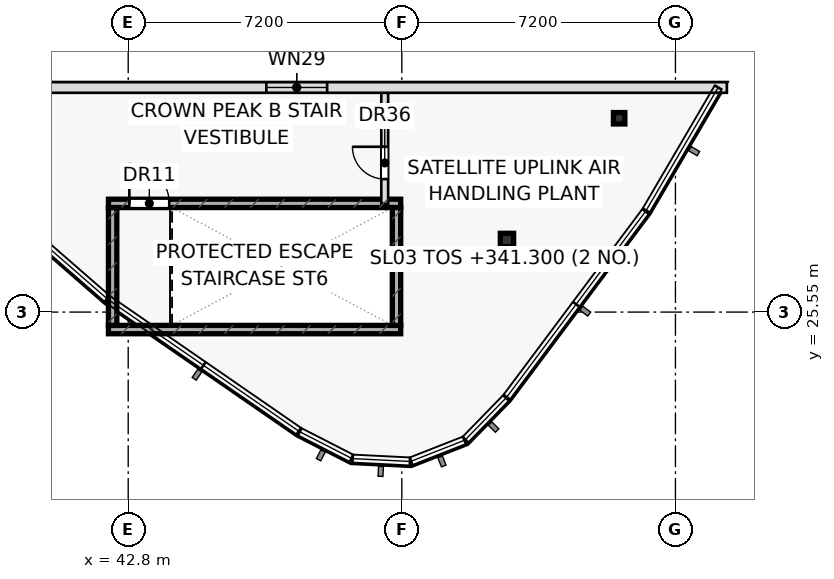
"""IFC4 building model, lengths in metres.
Left out: names, types, materials, properties, quantities, classifications, styles, units other than length and angle.
Written with IfcOpenShell. Run it as: python <this file> out.ifc"""

import sys

from ifc_helpers import new_model, si_unit, direction, frame, frame_2d, origin, origin_2d, place, context, subcontext, project, spatial, rectangle, hollow_rectangle, extrude, element, fill, save


model = new_model("IFC4")
c1 = context("Model", 3, precision=1e-05, world=origin(), true_north=direction((0.0, 1.0)))
c2 = subcontext(c1, "Body", "Model", "MODEL_VIEW")
j1 = project(units=[si_unit("LENGTHUNIT", "METRE"), si_unit("PLANEANGLEUNIT", "RADIAN")], contexts=[c1])
p1 = place(None, origin())
s1 = spatial("IfcSite", under=j1, at=p1, CompositionType="ELEMENT")
p2 = place(p1, origin())
s2 = spatial("IfcBuilding", under=s1, at=p2, CompositionType="ELEMENT")
p3 = place(p2, frame((0.0, 0.0, 341.3)))
s3 = spatial("IfcBuildingStorey", under=s2, at=p3, CompositionType="ELEMENT", Elevation=341.3)
p4 = place(p3, frame((42.28, 25.09, 0.0), z_axis=(0.0, 0.0, 1.0), x_axis=(1.0, 0.0, 0.0)))
e1 = element("IfcWall", 1, at=p4, inside=s3, PredefinedType="SHEAR", context=c2, shape_type="SweptSolid", body=[
    extrude(rectangle(XDim=7.69, YDim=0.22, at=frame_2d((3.845, 0.0))), origin(), (0.0, 0.0, 1.0), 4.25),
])
p5 = place(p3, frame((42.28, 28.41, 0.0), z_axis=(0.0, 0.0, 1.0), x_axis=(1.0, 0.0, 0.0)))
e2 = element("IfcWall", 2, at=p5, inside=s3, PredefinedType="SHEAR", context=c2, shape_type="SweptSolid", body=[
    extrude(rectangle(XDim=7.69, YDim=0.22, at=frame_2d((3.845, 0.0))), origin(), (0.0, 0.0, 1.0), 4.25),
])
p6 = place(p5, frame((0.55, 0.0, 0.0)))
e3 = element("IfcOpeningElement", 3, at=p6, cuts=e2, PredefinedType="OPENING", context=c2, shape_type="SweptSolid", body=[
    extrude(rectangle(XDim=1.05, YDim=2.2, at=frame_2d((0.525, 1.1))), frame((0.0, 0.12, 0.0), z_axis=(0.0, -1.0, 0.0), x_axis=(1.0, 0.0, 0.0)), (0.0, 0.0, 1.0), 0.24),
])
for number, where, z_axis, x_axis in (
    (4, (49.86, 25.2, 0.0), (0.0, 0.0, 1.0), (0.0, 1.0, 0.0)),
    (5, (42.39, 25.2, 0.0), (0.0, 0.0, 1.0), (0.0, 1.0, 0.0)),
):
    element("IfcWall", number, at=place(p3, frame(where, z_axis=z_axis, x_axis=x_axis)), inside=s3, PredefinedType="SHEAR", context=c2, shape_type="SweptSolid", body=[
        extrude(rectangle(XDim=3.1, YDim=0.22, at=frame_2d((1.55, 0.0))), origin(), (0.0, 0.0, 1.0), 4.25),
    ])
p7 = place(p3, frame((52.767, 27.448, 0.0), z_axis=(0.0, 0.0, 1.0), x_axis=(1.0, 0.0, 0.0)))
e6 = element("IfcColumn", 6, at=p7, inside=s3, PredefinedType="COLUMN", context=c2, shape_type="SweptSolid", body=[
    extrude(hollow_rectangle(XDim=0.35, YDim=0.35, WallThickness=0.02, at=origin_2d()), origin(), (0.0, 0.0, 1.0), 4.25),
])
p8 = place(p3, frame((55.719, 30.65, 0.0), z_axis=(0.0, 0.0, 1.0), x_axis=(1.0, 0.0, 0.0)))
e7 = element("IfcColumn", 7, at=p8, inside=s3, PredefinedType="COLUMN", context=c2, shape_type="SweptSolid", body=[
    extrude(hollow_rectangle(XDim=0.3, YDim=0.3, WallThickness=0.016, at=origin_2d()), origin(), (0.0, 0.0, 1.0), 4.25),
])
p9 = place(p3, frame((49.55, 28.4, 0.0), z_axis=(0.0, 0.0, 1.0), x_axis=(0.0, 1.0, 0.0)))
e8 = element("IfcWall", 8, at=p9, inside=s3, PredefinedType="PARTITIONING", context=c2, shape_type="SweptSolid", body=[
    extrude(rectangle(XDim=3.1, YDim=0.18, at=frame_2d((1.55, 0.0))), origin(), (0.0, 0.0, 1.0), 4.25),
])
p10 = place(p9, frame((0.65, 0.0, 0.0)))
e9 = element("IfcOpeningElement", 9, at=p10, cuts=e8, PredefinedType="OPENING", context=c2, shape_type="SweptSolid", body=[
    extrude(rectangle(XDim=0.85, YDim=2.05, at=frame_2d((0.425, 1.025))), frame((0.0, 0.1, 0.0), z_axis=(0.0, -1.0, 0.0), x_axis=(1.0, 0.0, 0.0)), (0.0, 0.0, 1.0), 0.2),
])
p11 = place(p3, frame((58.554, 31.46, 0.0), z_axis=(0.0, 0.0, 1.0), x_axis=(-1.0, 0.0, 0.0)))
e10 = element("IfcWall", 10, at=p11, inside=s3, PredefinedType="STANDARD", context=c2, shape_type="SweptSolid", body=[
    extrude(rectangle(XDim=22.638, YDim=0.28, at=frame_2d((11.319, 0.0))), origin(), (0.0, 0.0, 1.0), 4.25),
])
p12 = place(p11, frame((10.519, 0.0, 0.95)))
e11 = element("IfcOpeningElement", 11, at=p12, cuts=e10, PredefinedType="OPENING", context=c2, shape_type="SweptSolid", body=[
    extrude(rectangle(XDim=1.6, YDim=2.1, at=frame_2d((0.8, 1.05))), frame((0.0, 0.15, 0.0), z_axis=(0.0, -1.0, 0.0), x_axis=(1.0, 0.0, 0.0)), (0.0, 0.0, 1.0), 0.3),
])
p13 = place(p6, origin())
e12 = element("IfcDoor", 12, at=p13, inside=s3, OperationType="SINGLE_SWING_LEFT", PredefinedType="DOOR", context=c2, shape_type="SweptSolid", body=[
    extrude(rectangle(XDim=1.05, YDim=2.2, at=frame_2d((0.525, 1.1))), frame((0.0, 0.025, 0.0), z_axis=(0.0, -1.0, 0.0), x_axis=(1.0, 0.0, 0.0)), (0.0, 0.0, 1.0), 0.05),
])
fill(e3, e12)
p14 = place(p10, origin())
e13 = element("IfcDoor", 13, at=p14, inside=s3, OperationType="SINGLE_SWING_RIGHT", PredefinedType="DOOR", context=c2, shape_type="SweptSolid", body=[
    extrude(rectangle(XDim=0.85, YDim=2.05, at=frame_2d((0.425, 1.025))), frame((0.0, 0.025, 0.0), z_axis=(0.0, -1.0, 0.0), x_axis=(1.0, 0.0, 0.0)), (0.0, 0.0, 1.0), 0.05),
])
fill(e9, e13)
p15 = place(p12, origin())
e14 = element("IfcWindow", 14, at=p15, inside=s3, PartitioningType="SINGLE_PANEL", PredefinedType="WINDOW", context=c2, shape_type="SweptSolid", body=[
    extrude(rectangle(XDim=1.6, YDim=2.1, at=frame_2d((0.8, 1.05))), frame((0.0, 0.03, 0.0), z_axis=(0.0, -1.0, 0.0), x_axis=(1.0, 0.0, 0.0)), (0.0, 0.0, 1.0), 0.06),
])
fill(e11, e14)
save(model, sys.argv[1])
